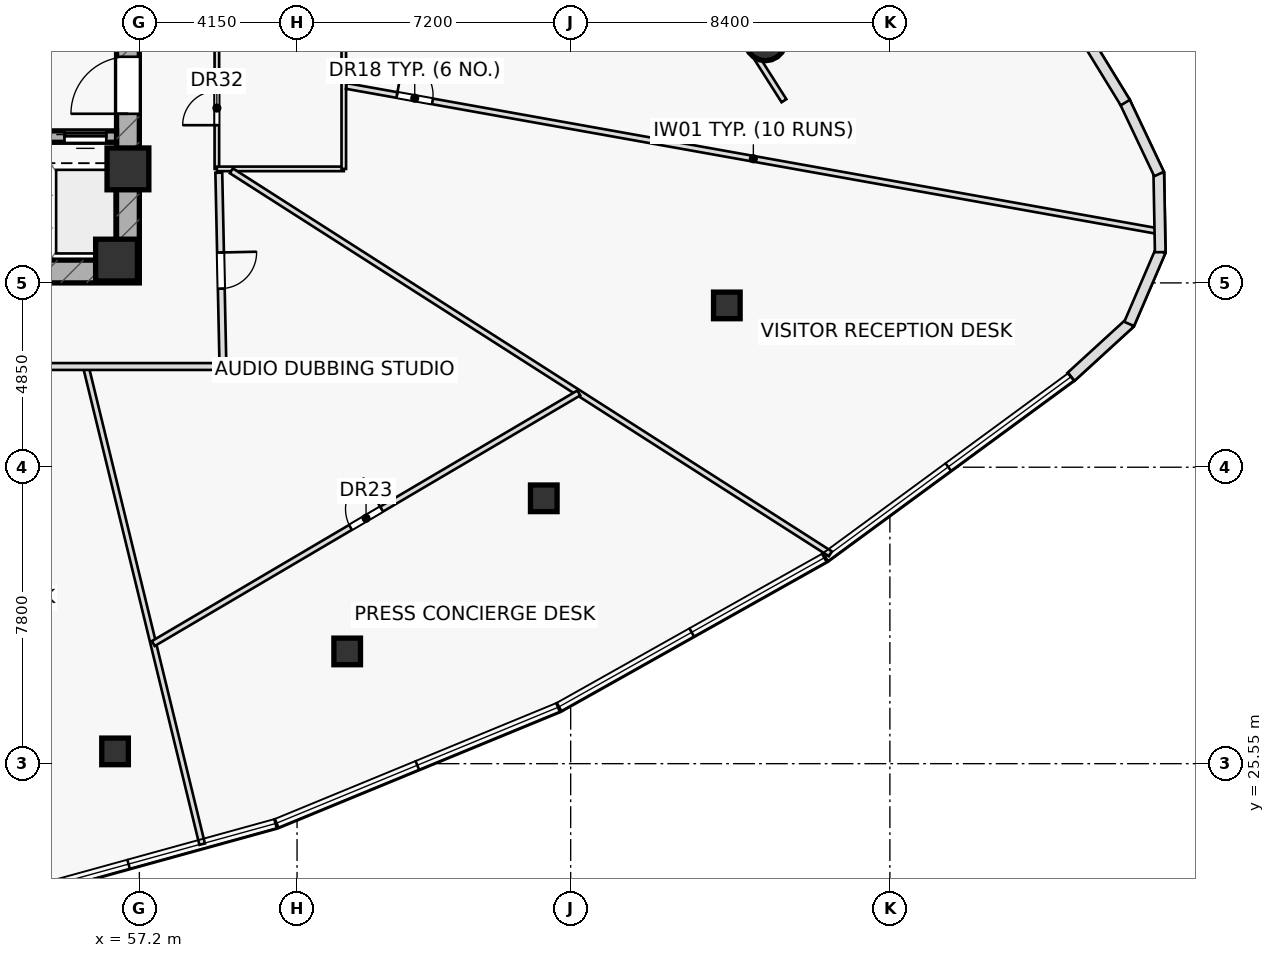
"""IFC4 building model, lengths in metres.
Left out: names, types, materials, properties, quantities, classifications, styles, units other than length and angle.
Written with IfcOpenShell. Run it as: python <this file> out.ifc"""

import sys

from ifc_helpers import new_model, si_unit, direction, frame, frame_2d, origin, origin_2d, place, context, subcontext, project, spatial, rectangle, hollow_rectangle, hollow_circle, extrude, element, fill, save


model = new_model("IFC4")
c1 = context("Model", 3, precision=1e-05, world=origin(), true_north=direction((0.0, 1.0)))
c2 = subcontext(c1, "Body", "Model", "MODEL_VIEW")
j1 = project(units=[si_unit("LENGTHUNIT", "METRE"), si_unit("PLANEANGLEUNIT", "RADIAN")], contexts=[c1])
p1 = place(None, origin())
s1 = spatial("IfcSite", under=j1, at=p1, CompositionType="ELEMENT")
p2 = place(p1, origin())
s2 = spatial("IfcBuilding", under=s1, at=p2, CompositionType="ELEMENT")
p3 = place(p2, frame((0.0, 0.0, 110.4)))
s3 = spatial("IfcBuildingStorey", under=s2, at=p3, CompositionType="ELEMENT", Elevation=110.4)
p4 = place(p3, frame((42.8, 38.5, 0.0), z_axis=(0.0, 0.0, 1.0), x_axis=(1.0, 0.0, 0.0)))
e1 = element("IfcWall", 1, at=p4, inside=s3, PredefinedType="SHEAR", context=c2, shape_type="SweptSolid", body=[
    extrude(rectangle(XDim=14.4, YDim=0.6, at=frame_2d((7.2, 0.0))), origin(), (0.0, 0.0, 1.0), 4.9),
])
p5 = place(p4, frame((0.88, 0.0, 0.0)))
e2 = element("IfcOpeningElement", 2, at=p5, cuts=e1, PredefinedType="OPENING", context=c2, shape_type="SweptSolid", body=[
    extrude(rectangle(XDim=1.05, YDim=2.2, at=frame_2d((0.525, 1.1))), frame((0.0, 0.31, 0.0), z_axis=(0.0, -1.0, 0.0), x_axis=(1.0, 0.0, 0.0)), (0.0, 0.0, 1.0), 0.62),
])
p6 = place(p3, frame((56.9, 38.8, 0.0), z_axis=(0.0, 0.0, 1.0), x_axis=(0.0, 1.0, 0.0)))
e3 = element("IfcWall", 3, at=p6, inside=s3, PredefinedType="SHEAR", context=c2, shape_type="SweptSolid", body=[
    extrude(rectangle(XDim=12.4, YDim=0.6, at=frame_2d((6.2, 0.0))), origin(), (0.0, 0.0, 1.0), 4.9),
])
p7 = place(p6, frame((3.85, 0.0, 0.0)))
e4 = element("IfcOpeningElement", 4, at=p7, cuts=e3, PredefinedType="OPENING", context=c2, shape_type="SweptSolid", body=[
    extrude(rectangle(XDim=1.5, YDim=2.2, at=frame_2d((0.75, 1.1))), frame((0.0, 0.31, 0.0), z_axis=(0.0, -1.0, 0.0), x_axis=(1.0, 0.0, 0.0)), (0.0, 0.0, 1.0), 0.62),
])
p8 = place(p3, frame((43.4, 42.05, 0.0), z_axis=(0.0, 0.0, 1.0), x_axis=(1.0, 0.0, 0.0)))
e5 = element("IfcWall", 5, at=p8, inside=s3, PredefinedType="SHEAR", context=c2, shape_type="SweptSolid", body=[
    extrude(rectangle(XDim=13.2, YDim=0.3, at=frame_2d((6.6, 0.0))), origin(), (0.0, 0.0, 1.0), 4.9),
])
p9 = place(p8, frame((8.37, 0.0, 0.0)))
e6 = element("IfcOpeningElement", 6, at=p9, cuts=e5, PredefinedType="OPENING", context=c2, shape_type="SweptSolid", body=[
    extrude(rectangle(XDim=1.1, YDim=2.15, at=frame_2d((0.55, 1.075))), frame((0.0, 0.16, 0.0), z_axis=(0.0, -1.0, 0.0), x_axis=(1.0, 0.0, 0.0)), (0.0, 0.0, 1.0), 0.32),
])
p10 = place(p8, frame((10.09, 0.0, 0.0)))
e7 = element("IfcOpeningElement", 7, at=p10, cuts=e5, PredefinedType="OPENING", context=c2, shape_type="SweptSolid", body=[
    extrude(rectangle(XDim=1.1, YDim=2.15, at=frame_2d((0.55, 1.075))), frame((0.0, 0.16, 0.0), z_axis=(0.0, -1.0, 0.0), x_axis=(1.0, 0.0, 0.0)), (0.0, 0.0, 1.0), 0.32),
])
p11 = place(p8, frame((11.83, 0.0, 0.0)))
e8 = element("IfcOpeningElement", 8, at=p11, cuts=e5, PredefinedType="OPENING", context=c2, shape_type="SweptSolid", body=[
    extrude(rectangle(XDim=1.1, YDim=2.15, at=frame_2d((0.55, 1.075))), frame((0.0, 0.16, 0.0), z_axis=(0.0, -1.0, 0.0), x_axis=(1.0, 0.0, 0.0)), (0.0, 0.0, 1.0), 0.32),
])
for number, where, z_axis, x_axis in (
    (9, (56.9, 41.2, 0.0), (0.0, 0.0, 1.0), (1.0, 0.0, 0.0)),
    (10, (56.6, 38.8, 0.0), (0.0, 0.0, 1.0), (1.0, 0.0, 0.0)),
):
    element("IfcColumn", number, at=place(p3, frame(where, z_axis=z_axis, x_axis=x_axis)), inside=s3, PredefinedType="COLUMN", context=c2, shape_type="SweptSolid", body=[
        extrude(rectangle(XDim=1.1, YDim=1.1, at=origin_2d()), origin(), (0.0, 0.0, 1.0), 4.9),
    ])
for number, where, z_axis, x_axis in (
    (11, (56.561, 25.873, 0.0), (0.0, 0.0, 1.0), (1.0, 0.0, 0.0)),
    (12, (62.669, 28.503, 0.0), (0.0, 0.0, 1.0), (1.0, 0.0, 0.0)),
    (13, (67.842, 32.532, 0.0), (0.0, 0.0, 1.0), (1.0, 0.0, 0.0)),
    (14, (72.659, 37.607, 0.0), (0.0, 0.0, 1.0), (1.0, 0.0, 0.0)),
):
    element("IfcColumn", number, at=place(p3, frame(where, z_axis=z_axis, x_axis=x_axis)), inside=s3, PredefinedType="COLUMN", context=c2, shape_type="SweptSolid", body=[
        extrude(hollow_rectangle(XDim=0.7, YDim=0.7, WallThickness=0.04, at=origin_2d()), origin(), (0.0, 0.0, 1.0), 4.9),
    ])
p12 = place(p3, frame((73.676, 44.58, 0.0), z_axis=(0.0, 0.0, 1.0), x_axis=(1.0, 0.0, 0.0)))
e15 = element("IfcColumn", 15, at=p12, inside=s3, PredefinedType="COLUMN", context=c2, shape_type="SweptSolid", body=[
    extrude(hollow_circle(Radius=0.533, WallThickness=0.045, at=origin_2d()), origin(), (0.0, 0.0, 1.0), 4.9),
])
p13 = place(p3, frame((74.163, 42.993, 0.0), z_axis=(0.0, 0.0, 1.0), x_axis=(-0.53628142437, 0.844039237166, 0.0)))
e16 = element("IfcWall", 16, at=p13, inside=s3, PredefinedType="PARTITIONING", context=c2, shape_type="SweptSolid", body=[
    extrude(rectangle(XDim=10.267, YDim=0.15, at=frame_2d((5.133, 0.0))), origin(), (0.0, 0.0, 1.0), 4.185),
])
p14 = place(p3, frame((59.24, 41.2, 0.0), z_axis=(0.0, 0.0, 1.0), x_axis=(0.0, 1.0, 0.0)))
e17 = element("IfcWall", 17, at=p14, inside=s3, PredefinedType="PARTITIONING", context=c2, shape_type="SweptSolid", body=[
    extrude(rectangle(XDim=7.0, YDim=0.12, at=frame_2d((3.5, 0.0))), origin(), (0.0, 0.0, 1.0), 4.9),
])
p15 = place(p14, frame((1.15, 0.0, 0.0)))
e18 = element("IfcOpeningElement", 18, at=p15, cuts=e17, PredefinedType="OPENING", context=c2, shape_type="SweptSolid", body=[
    extrude(rectangle(XDim=0.9, YDim=2.05, at=frame_2d((0.45, 1.025))), frame((0.0, 0.07, 0.0), z_axis=(0.0, -1.0, 0.0), x_axis=(1.0, 0.0, 0.0)), (0.0, 0.0, 1.0), 0.14),
])
p16 = place(p14, frame((4.7, 0.0, 0.0)))
e19 = element("IfcOpeningElement", 19, at=p16, cuts=e17, PredefinedType="OPENING", context=c2, shape_type="SweptSolid", body=[
    extrude(rectangle(XDim=0.9, YDim=2.05, at=frame_2d((0.45, 1.025))), frame((0.0, 0.07, 0.0), z_axis=(0.0, -1.0, 0.0), x_axis=(1.0, 0.0, 0.0)), (0.0, 0.0, 1.0), 0.14),
])
p17 = place(p3, frame((59.24, 41.2, 0.0), z_axis=(0.0, 0.0, 1.0), x_axis=(1.0, 0.0, 0.0)))
e20 = element("IfcWall", 20, at=p17, inside=s3, PredefinedType="PARTITIONING", context=c2, shape_type="SweptSolid", body=[
    extrude(rectangle(XDim=3.34, YDim=0.12, at=frame_2d((1.67, 0.0))), origin(), (0.0, 0.0, 1.0), 4.9),
])
p18 = place(p3, frame((62.58, 41.2, 0.0), z_axis=(0.0, 0.0, 1.0), x_axis=(0.0, 1.0, 0.0)))
e21 = element("IfcWall", 21, at=p18, inside=s3, PredefinedType="PARTITIONING", context=c2, shape_type="SweptSolid", body=[
    extrude(rectangle(XDim=7.0, YDim=0.12, at=frame_2d((3.5, 0.0))), origin(), (0.0, 0.0, 1.0), 4.9),
])
p19 = place(p3, frame((55.792, 36.0, 0.0), z_axis=(0.0, 0.0, 1.0), x_axis=(0.236615967377, -0.971603254411, 0.0)))
e22 = element("IfcWall", 22, at=p19, inside=s3, PredefinedType="PARTITIONING", context=c2, shape_type="SweptSolid", body=[
    extrude(rectangle(XDim=12.936, YDim=0.15, at=frame_2d((6.468, 0.0))), origin(), (0.0, 0.0, 1.0), 4.185),
])
p20 = place(p3, frame((59.621, 41.15, 0.0), z_axis=(0.0, 0.0, 1.0), x_axis=(0.842493606908, -0.538706341451, 0.0)))
e23 = element("IfcWall", 23, at=p20, inside=s3, PredefinedType="PARTITIONING", context=c2, shape_type="SweptSolid", body=[
    extrude(rectangle(XDim=18.711, YDim=0.15, at=frame_2d((9.355, 0.0))), origin(), (0.0, 0.0, 1.0), 4.185),
])
p21 = place(p3, frame((62.65, 43.381, 0.0), z_axis=(0.0, 0.0, 1.0), x_axis=(0.984377109133, -0.176073016146, 0.0)))
e24 = element("IfcWall", 24, at=p21, inside=s3, PredefinedType="PARTITIONING", context=c2, shape_type="SweptSolid", body=[
    extrude(rectangle(XDim=21.754, YDim=0.15, at=frame_2d((10.877, 0.0))), origin(), (0.0, 0.0, 1.0), 4.185),
])
p22 = place(p21, frame((1.35, 0.0, 0.0)))
e25 = element("IfcOpeningElement", 25, at=p22, cuts=e24, PredefinedType="OPENING", context=c2, shape_type="SweptSolid", body=[
    extrude(rectangle(XDim=0.95, YDim=2.05, at=frame_2d((0.475, 1.025))), frame((0.0, 0.085, 0.0), z_axis=(0.0, -1.0, 0.0), x_axis=(1.0, 0.0, 0.0)), (0.0, 0.0, 1.0), 0.17),
])
p23 = place(p3, frame((57.567, 28.71, 0.0), z_axis=(0.0, 0.0, 1.0), x_axis=(0.861688261209, 0.507438016407, 0.0)))
e26 = element("IfcWall", 26, at=p23, inside=s3, PredefinedType="PARTITIONING", context=c2, shape_type="SweptSolid", body=[
    extrude(rectangle(XDim=12.994, YDim=0.15, at=frame_2d((6.497, 0.0))), origin(), (0.0, 0.0, 1.0), 4.185),
])
p24 = place(p23, frame((6.022, 0.0, 0.0)))
e27 = element("IfcOpeningElement", 27, at=p24, cuts=e26, PredefinedType="OPENING", context=c2, shape_type="SweptSolid", body=[
    extrude(rectangle(XDim=0.95, YDim=2.05, at=frame_2d((0.475, 1.025))), frame((0.0, 0.085, 0.0), z_axis=(0.0, -1.0, 0.0), x_axis=(1.0, 0.0, 0.0)), (0.0, 0.0, 1.0), 0.17),
])
p25 = place(p3, frame((59.291, 41.1, 0.0), z_axis=(0.0, 0.0, 1.0), x_axis=(0.021374589398, -0.999771537366, 0.0)))
e28 = element("IfcWall", 28, at=p25, inside=s3, PredefinedType="PARTITIONING", context=c2, shape_type="SweptSolid", body=[
    extrude(rectangle(XDim=5.151, YDim=0.18, at=frame_2d((2.576, 0.0))), origin(), (0.0, 0.0, 1.0), 4.185),
])
p26 = place(p25, frame((2.101, 0.0, 0.0)))
e29 = element("IfcOpeningElement", 29, at=p26, cuts=e28, PredefinedType="OPENING", context=c2, shape_type="SweptSolid", body=[
    extrude(rectangle(XDim=0.95, YDim=2.05, at=frame_2d((0.475, 1.025))), frame((0.0, 0.1, 0.0), z_axis=(0.0, -1.0, 0.0), x_axis=(1.0, 0.0, 0.0)), (0.0, 0.0, 1.0), 0.2),
])
p27 = place(p3, frame((59.45, 36.0, 0.0), z_axis=(0.0, 0.0, 1.0), x_axis=(-1.0, 0.0, 0.0)))
e30 = element("IfcWall", 30, at=p27, inside=s3, PredefinedType="PARTITIONING", context=c2, shape_type="SweptSolid", body=[
    extrude(rectangle(XDim=21.95, YDim=0.18, at=frame_2d((10.975, 0.0))), origin(), (0.0, 0.0, 1.0), 4.185),
])
p28 = place(p27, frame((12.2, 0.0, 0.0)))
e31 = element("IfcOpeningElement", 31, at=p28, cuts=e30, PredefinedType="OPENING", context=c2, shape_type="SweptSolid", body=[
    extrude(rectangle(XDim=0.95, YDim=2.05, at=frame_2d((0.475, 1.025))), frame((0.0, 0.1, 0.0), z_axis=(0.0, -1.0, 0.0), x_axis=(1.0, 0.0, 0.0)), (0.0, 0.0, 1.0), 0.2),
])
p29 = place(p3, frame((81.716, 35.729, 0.0), z_axis=(0.0, 0.0, 1.0), x_axis=(0.737892982282, 0.674917733282, 0.0)))
e32 = element("IfcWall", 32, at=p29, inside=s3, PredefinedType="STANDARD", context=c2, shape_type="SweptSolid", body=[
    extrude(rectangle(XDim=2.097, YDim=0.28, at=frame_2d((1.049, 0.0))), origin(), (0.0, 0.0, 1.0), 4.9),
])
p30 = place(p3, frame((83.246, 37.121, 0.0), z_axis=(0.0, 0.0, 1.0), x_axis=(0.39478079267, 0.918775340189, 0.0)))
e33 = element("IfcWall", 33, at=p30, inside=s3, PredefinedType="STANDARD", context=c2, shape_type="SweptSolid", body=[
    extrude(rectangle(XDim=2.086, YDim=0.28, at=frame_2d((1.043, 0.0))), origin(), (0.0, 0.0, 1.0), 4.9),
])
p31 = place(p3, frame((84.064, 39.008, 0.0), z_axis=(0.0, 0.0, 1.0), x_axis=(-0.018259657159, 0.999833278562, 0.0)))
e34 = element("IfcWall", 34, at=p31, inside=s3, PredefinedType="STANDARD", context=c2, shape_type="SweptSolid", body=[
    extrude(rectangle(XDim=2.086, YDim=0.28, at=frame_2d((1.043, 0.0))), origin(), (0.0, 0.0, 1.0), 4.9),
])
p32 = place(p3, frame((84.032, 41.065, 0.0), z_axis=(0.0, 0.0, 1.0), x_axis=(-0.428170954588, 0.903697755695, 0.0)))
e35 = element("IfcWall", 35, at=p32, inside=s3, PredefinedType="STANDARD", context=c2, shape_type="SweptSolid", body=[
    extrude(rectangle(XDim=2.109, YDim=0.28, at=frame_2d((1.054, 0.0))), origin(), (0.0, 0.0, 1.0), 4.9),
])
p33 = place(p3, frame((83.144, 42.944, 0.0), z_axis=(0.0, 0.0, 1.0), x_axis=(-0.522840865812, 0.852430307437, 0.0)))
e36 = element("IfcWall", 36, at=p33, inside=s3, PredefinedType="STANDARD", context=c2, shape_type="SweptSolid", body=[
    extrude(rectangle(XDim=8.069, YDim=0.28, at=frame_2d((4.034, 0.0))), origin(), (0.0, 0.0, 1.0), 4.9),
])
p34 = place(p7, origin())
e37 = element("IfcDoor", 37, at=p34, inside=s3, OperationType="SINGLE_SWING_LEFT", PredefinedType="DOOR", context=c2, shape_type="SweptSolid", body=[
    extrude(rectangle(XDim=1.5, YDim=2.2, at=frame_2d((0.75, 1.1))), frame((0.0, 0.025, 0.0), z_axis=(0.0, -1.0, 0.0), x_axis=(1.0, 0.0, 0.0)), (0.0, 0.0, 1.0), 0.05),
])
fill(e4, e37)
p35 = place(p15, origin())
e38 = element("IfcDoor", 38, at=p35, inside=s3, OperationType="SINGLE_SWING_LEFT", PredefinedType="DOOR", context=c2, shape_type="SweptSolid", body=[
    extrude(rectangle(XDim=0.9, YDim=2.05, at=frame_2d((0.45, 1.025))), frame((0.0, 0.025, 0.0), z_axis=(0.0, -1.0, 0.0), x_axis=(1.0, 0.0, 0.0)), (0.0, 0.0, 1.0), 0.05),
])
fill(e18, e38)
p36 = place(p22, origin())
e39 = element("IfcDoor", 39, at=p36, inside=s3, OperationType="SINGLE_SWING_LEFT", PredefinedType="DOOR", context=c2, shape_type="SweptSolid", body=[
    extrude(rectangle(XDim=0.95, YDim=2.05, at=frame_2d((0.475, 1.025))), frame((0.0, 0.025, 0.0), z_axis=(0.0, -1.0, 0.0), x_axis=(1.0, 0.0, 0.0)), (0.0, 0.0, 1.0), 0.05),
])
fill(e25, e39)
p37 = place(p24, origin())
e40 = element("IfcDoor", 40, at=p37, inside=s3, OperationType="SINGLE_SWING_RIGHT", PredefinedType="DOOR", context=c2, shape_type="SweptSolid", body=[
    extrude(rectangle(XDim=0.95, YDim=2.05, at=frame_2d((0.475, 1.025))), frame((0.0, 0.025, 0.0), z_axis=(0.0, -1.0, 0.0), x_axis=(1.0, 0.0, 0.0)), (0.0, 0.0, 1.0), 0.05),
])
fill(e27, e40)
p38 = place(p26, origin())
e41 = element("IfcDoor", 41, at=p38, inside=s3, OperationType="SINGLE_SWING_LEFT", PredefinedType="DOOR", context=c2, shape_type="SweptSolid", body=[
    extrude(rectangle(XDim=0.95, YDim=2.05, at=frame_2d((0.475, 1.025))), frame((0.0, 0.025, 0.0), z_axis=(0.0, -1.0, 0.0), x_axis=(1.0, 0.0, 0.0)), (0.0, 0.0, 1.0), 0.05),
])
fill(e29, e41)
p39 = place(p11, origin())
e42 = element("IfcDoor", 42, at=p39, inside=s3, OperationType="SLIDING_TO_LEFT", PredefinedType="DOOR", context=c2, shape_type="SweptSolid", body=[
    extrude(rectangle(XDim=1.1, YDim=2.15, at=frame_2d((0.55, 1.075))), frame((0.0, 0.025, 0.0), z_axis=(0.0, -1.0, 0.0), x_axis=(1.0, 0.0, 0.0)), (0.0, 0.0, 1.0), 0.05),
])
fill(e8, e42)
save(model, sys.argv[1])
